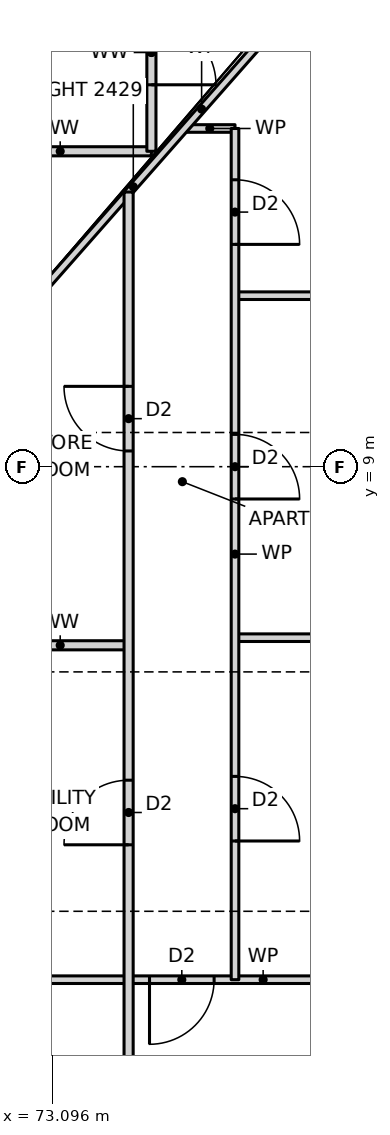
"""IFC4 building model, lengths in metres.
Left out: names, types, materials, properties, quantities, classifications, styles, units other than length and angle.
Written with IfcOpenShell. Run it as: python <this file> out.ifc"""

import sys

from ifc_helpers import new_model, si_unit, direction, frame, frame_2d, origin, place, context, subcontext, project, spatial, rectangle, extrude, element, fill, save


model = new_model("IFC4")
c1 = context("Model", 3, precision=1e-05, world=origin(), true_north=direction((0.0, 1.0)))
c2 = subcontext(c1, "Body", "Model", "MODEL_VIEW")
j1 = project(units=[si_unit("LENGTHUNIT", "METRE"), si_unit("PLANEANGLEUNIT", "RADIAN")], contexts=[c1])
p1 = place(None, origin())
s1 = spatial("IfcSite", under=j1, at=p1, CompositionType="ELEMENT")
p2 = place(p1, origin())
s2 = spatial("IfcBuilding", under=s1, at=p2, CompositionType="ELEMENT")
p3 = place(p2, frame((0.0, 0.0, 53.5)))
s3 = spatial("IfcBuildingStorey", under=s2, at=p3, CompositionType="ELEMENT", Elevation=53.5)
p4 = place(p3, frame((72.3, 2.25, 0.0), z_axis=(0.0, 0.0, 1.0), x_axis=(1.0, 0.0, 0.0)))
e1 = element("IfcWall", 1, at=p4, inside=s3, PredefinedType="PARTITIONING", context=c2, shape_type="SweptSolid", body=[
    extrude(rectangle(XDim=7.14, YDim=0.1, at=frame_2d((3.57, 0.0))), origin(), (0.0, 0.0, 1.0), 3.27),
])
p5 = place(p4, frame((2.075, 0.0, 0.0)))
e2 = element("IfcOpeningElement", 2, at=p5, cuts=e1, PredefinedType="OPENING", context=c2, shape_type="SweptSolid", body=[
    extrude(rectangle(XDim=0.85, YDim=2.1, at=frame_2d((0.425, 1.05))), frame((0.0, 0.06, 0.0), z_axis=(0.0, -1.0, 0.0), x_axis=(1.0, 0.0, 0.0)), (0.0, 0.0, 1.0), 0.12),
])
p6 = place(p3, frame((72.3, 6.65, 0.0), z_axis=(0.0, 0.0, 1.0), x_axis=(1.0, 0.0, 0.0)))
e3 = element("IfcWall", 3, at=p6, inside=s3, PredefinedType="PARTITIONING", context=c2, shape_type="SweptSolid", body=[
    extrude(rectangle(XDim=1.8, YDim=0.12, at=frame_2d((0.9, 0.0))), origin(), (0.0, 0.0, 1.0), 3.27),
])
for number, where, z_axis, x_axis in (
    (4, (75.5, 6.75, 0.0), (0.0, 0.0, 1.0), (1.0, 0.0, 0.0)),
    (5, (75.5, 11.25, 0.0), (0.0, 0.0, 1.0), (1.0, 0.0, 0.0)),
):
    element("IfcWall", number, at=place(p3, frame(where, z_axis=z_axis, x_axis=x_axis)), inside=s3, PredefinedType="PARTITIONING", context=c2, shape_type="SweptSolid", body=[
        extrude(rectangle(XDim=3.94, YDim=0.1, at=frame_2d((1.97, 0.0))), origin(), (0.0, 0.0, 1.0), 3.27),
    ])
p7 = place(p3, frame((72.0, 13.15, 0.0), z_axis=(0.0, 0.0, 1.0), x_axis=(1.0, 0.0, 0.0)))
e6 = element("IfcWall", 6, at=p7, inside=s3, PredefinedType="PARTITIONING", context=c2, shape_type="SweptSolid", body=[
    extrude(rectangle(XDim=2.4, YDim=0.12, at=frame_2d((1.2, 0.0))), origin(), (0.0, 0.0, 1.0), 3.27),
])
p8 = place(p3, frame((74.836, 13.45, 0.0), z_axis=(0.0, 0.0, 1.0), x_axis=(1.0, 0.0, 0.0)))
e7 = element("IfcWall", 7, at=p8, inside=s3, PredefinedType="PARTITIONING", context=c2, shape_type="SweptSolid", body=[
    extrude(rectangle(XDim=0.664, YDim=0.1, at=frame_2d((0.332, 0.0))), origin(), (0.0, 0.0, 1.0), 3.27),
])
p9 = place(p3, frame((72.064, 10.3, 0.0), z_axis=(0.0, 0.0, 1.0), x_axis=(0.660700699661, 0.750649442461, 0.0)))
e8 = element("IfcWall", 8, at=p9, inside=s3, PredefinedType="PARTITIONING", context=c2, shape_type="SweptSolid", body=[
    extrude(rectangle(XDim=9.071, YDim=0.1, at=frame_2d((4.535, 0.0))), origin(), (0.0, 0.0, 1.0), 2.429),
])
p10 = place(p3, frame((75.5, 2.25, 0.0), z_axis=(0.0, 0.0, 1.0), x_axis=(0.0, 1.0, 0.0)))
e9 = element("IfcWall", 9, at=p10, inside=s3, PredefinedType="PARTITIONING", context=c2, shape_type="SweptSolid", body=[
    extrude(rectangle(XDim=11.2, YDim=0.1, at=frame_2d((5.6, 0.0))), origin(), (0.0, 0.0, 1.0), 3.27),
])
p11 = place(p10, frame((1.825, 0.0, 0.0)))
e10 = element("IfcOpeningElement", 10, at=p11, cuts=e9, PredefinedType="OPENING", context=c2, shape_type="SweptSolid", body=[
    extrude(rectangle(XDim=0.85, YDim=2.1, at=frame_2d((0.425, 1.05))), frame((0.0, 0.06, 0.0), z_axis=(0.0, -1.0, 0.0), x_axis=(1.0, 0.0, 0.0)), (0.0, 0.0, 1.0), 0.12),
])
p12 = place(p10, frame((6.325, 0.0, 0.0)))
e11 = element("IfcOpeningElement", 11, at=p12, cuts=e9, PredefinedType="OPENING", context=c2, shape_type="SweptSolid", body=[
    extrude(rectangle(XDim=0.85, YDim=2.1, at=frame_2d((0.425, 1.05))), frame((0.0, 0.06, 0.0), z_axis=(0.0, -1.0, 0.0), x_axis=(1.0, 0.0, 0.0)), (0.0, 0.0, 1.0), 0.12),
])
p13 = place(p10, frame((9.675, 0.0, 0.0)))
e12 = element("IfcOpeningElement", 12, at=p13, cuts=e9, PredefinedType="OPENING", context=c2, shape_type="SweptSolid", body=[
    extrude(rectangle(XDim=0.85, YDim=2.1, at=frame_2d((0.425, 1.05))), frame((0.0, 0.06, 0.0), z_axis=(0.0, -1.0, 0.0), x_axis=(1.0, 0.0, 0.0)), (0.0, 0.0, 1.0), 0.12),
])
p14 = place(p3, frame((74.4, 13.15, 0.0), z_axis=(0.0, 0.0, 1.0), x_axis=(0.0, 1.0, 0.0)))
e13 = element("IfcWall", 13, at=p14, inside=s3, PredefinedType="PARTITIONING", context=c2, shape_type="SweptSolid", body=[
    extrude(rectangle(XDim=2.6, YDim=0.12, at=frame_2d((1.3, 0.0))), origin(), (0.0, 0.0, 1.0), 3.27),
])
p15 = place(p14, frame((0.875, 0.0, 0.0)))
e14 = element("IfcOpeningElement", 14, at=p15, cuts=e13, PredefinedType="OPENING", context=c2, shape_type="SweptSolid", body=[
    extrude(rectangle(XDim=0.85, YDim=2.1, at=frame_2d((0.425, 1.05))), frame((0.0, 0.07, 0.0), z_axis=(0.0, -1.0, 0.0), x_axis=(1.0, 0.0, 0.0)), (0.0, 0.0, 1.0), 0.14),
])
p16 = place(p3, frame((74.1, -12.614, 0.0), z_axis=(0.0, 0.0, 1.0), x_axis=(0.0, 1.0, 0.0)))
e15 = element("IfcWall", 15, at=p16, inside=s3, PredefinedType="PARTITIONING", context=c2, shape_type="SweptSolid", body=[
    extrude(rectangle(XDim=25.228, YDim=0.12, at=frame_2d((12.614, 0.0))), origin(), (0.0, 0.0, 1.0), 3.27),
])
p17 = place(p16, frame((7.239, 0.0, 0.0)))
e16 = element("IfcOpeningElement", 16, at=p17, cuts=e15, PredefinedType="OPENING", context=c2, shape_type="SweptSolid", body=[
    extrude(rectangle(XDim=0.85, YDim=2.1, at=frame_2d((0.425, 1.05))), frame((0.0, 0.07, 0.0), z_axis=(0.0, -1.0, 0.0), x_axis=(1.0, 0.0, 0.0)), (0.0, 0.0, 1.0), 0.14),
])
p18 = place(p16, frame((10.439, 0.0, 0.0)))
e17 = element("IfcOpeningElement", 17, at=p18, cuts=e15, PredefinedType="OPENING", context=c2, shape_type="SweptSolid", body=[
    extrude(rectangle(XDim=0.85, YDim=2.1, at=frame_2d((0.425, 1.05))), frame((0.0, 0.07, 0.0), z_axis=(0.0, -1.0, 0.0), x_axis=(1.0, 0.0, 0.0)), (0.0, 0.0, 1.0), 0.14),
])
p19 = place(p16, frame((2.507, 0.0, 0.0)))
e18 = element("IfcOpeningElement", 18, at=p19, cuts=e15, PredefinedType="OPENING", context=c2, shape_type="SweptSolid", body=[
    extrude(rectangle(XDim=0.85, YDim=2.1, at=frame_2d((0.425, 1.05))), frame((0.0, 0.07, 0.0), z_axis=(0.0, -1.0, 0.0), x_axis=(1.0, 0.0, 0.0)), (0.0, 0.0, 1.0), 0.14),
])
p20 = place(p16, frame((16.639, 0.0, 0.0)))
e19 = element("IfcOpeningElement", 19, at=p20, cuts=e15, PredefinedType="OPENING", context=c2, shape_type="SweptSolid", body=[
    extrude(rectangle(XDim=0.85, YDim=2.1, at=frame_2d((0.425, 1.05))), frame((0.0, 0.07, 0.0), z_axis=(0.0, -1.0, 0.0), x_axis=(1.0, 0.0, 0.0)), (0.0, 0.0, 1.0), 0.14),
])
p21 = place(p16, frame((21.821, 0.0, 0.0)))
e20 = element("IfcOpeningElement", 20, at=p21, cuts=e15, PredefinedType="OPENING", context=c2, shape_type="SweptSolid", body=[
    extrude(rectangle(XDim=0.85, YDim=2.1, at=frame_2d((0.425, 1.05))), frame((0.0, 0.07, 0.0), z_axis=(0.0, -1.0, 0.0), x_axis=(1.0, 0.0, 0.0)), (0.0, 0.0, 1.0), 0.14),
])
p22 = place(p5, frame((0.85, 0.0, 0.0), z_axis=(0.0, 0.0, 1.0), x_axis=(-1.0, 0.0, 0.0)))
e21 = element("IfcDoor", 21, at=p22, inside=s3, OperationType="SINGLE_SWING_RIGHT", PredefinedType="DOOR", context=c2, shape_type="SweptSolid", body=[
    extrude(rectangle(XDim=0.85, YDim=2.1, at=frame_2d((0.425, 1.05))), frame((0.0, 0.025, 0.0), z_axis=(0.0, -1.0, 0.0), x_axis=(1.0, 0.0, 0.0)), (0.0, 0.0, 1.0), 0.05),
])
fill(e2, e21)
p23 = place(p11, frame((0.85, 0.0, 0.0), z_axis=(0.0, 0.0, 1.0), x_axis=(-1.0, 0.0, 0.0)))
e22 = element("IfcDoor", 22, at=p23, inside=s3, OperationType="SINGLE_SWING_RIGHT", PredefinedType="DOOR", context=c2, shape_type="SweptSolid", body=[
    extrude(rectangle(XDim=0.85, YDim=2.1, at=frame_2d((0.425, 1.05))), frame((0.0, 0.025, 0.0), z_axis=(0.0, -1.0, 0.0), x_axis=(1.0, 0.0, 0.0)), (0.0, 0.0, 1.0), 0.05),
])
fill(e10, e22)
p24 = place(p12, frame((0.85, 0.0, 0.0), z_axis=(0.0, 0.0, 1.0), x_axis=(-1.0, 0.0, 0.0)))
e23 = element("IfcDoor", 23, at=p24, inside=s3, OperationType="SINGLE_SWING_RIGHT", PredefinedType="DOOR", context=c2, shape_type="SweptSolid", body=[
    extrude(rectangle(XDim=0.85, YDim=2.1, at=frame_2d((0.425, 1.05))), frame((0.0, 0.025, 0.0), z_axis=(0.0, -1.0, 0.0), x_axis=(1.0, 0.0, 0.0)), (0.0, 0.0, 1.0), 0.05),
])
fill(e11, e23)
p25 = place(p13, frame((0.85, 0.0, 0.0), z_axis=(0.0, 0.0, 1.0), x_axis=(-1.0, 0.0, 0.0)))
e24 = element("IfcDoor", 24, at=p25, inside=s3, OperationType="SINGLE_SWING_RIGHT", PredefinedType="DOOR", context=c2, shape_type="SweptSolid", body=[
    extrude(rectangle(XDim=0.85, YDim=2.1, at=frame_2d((0.425, 1.05))), frame((0.0, 0.025, 0.0), z_axis=(0.0, -1.0, 0.0), x_axis=(1.0, 0.0, 0.0)), (0.0, 0.0, 1.0), 0.05),
])
fill(e12, e24)
p26 = place(p20, origin())
e25 = element("IfcDoor", 25, at=p26, inside=s3, OperationType="SINGLE_SWING_LEFT", PredefinedType="DOOR", context=c2, shape_type="SweptSolid", body=[
    extrude(rectangle(XDim=0.85, YDim=2.1, at=frame_2d((0.425, 1.05))), frame((0.0, 0.025, 0.0), z_axis=(0.0, -1.0, 0.0), x_axis=(1.0, 0.0, 0.0)), (0.0, 0.0, 1.0), 0.05),
])
fill(e19, e25)
p27 = place(p21, origin())
e26 = element("IfcDoor", 26, at=p27, inside=s3, OperationType="SINGLE_SWING_RIGHT", PredefinedType="DOOR", context=c2, shape_type="SweptSolid", body=[
    extrude(rectangle(XDim=0.85, YDim=2.1, at=frame_2d((0.425, 1.05))), frame((0.0, 0.025, 0.0), z_axis=(0.0, -1.0, 0.0), x_axis=(1.0, 0.0, 0.0)), (0.0, 0.0, 1.0), 0.05),
])
fill(e20, e26)
p28 = place(p15, frame((0.85, 0.0, 0.0), z_axis=(0.0, 0.0, 1.0), x_axis=(-1.0, 0.0, 0.0)))
e27 = element("IfcDoor", 27, at=p28, inside=s3, OperationType="SINGLE_SWING_RIGHT", PredefinedType="DOOR", context=c2, shape_type="SweptSolid", body=[
    extrude(rectangle(XDim=0.85, YDim=2.1, at=frame_2d((0.425, 1.05))), frame((0.0, 0.025, 0.0), z_axis=(0.0, -1.0, 0.0), x_axis=(1.0, 0.0, 0.0)), (0.0, 0.0, 1.0), 0.05),
])
fill(e14, e27)
save(model, sys.argv[1])
